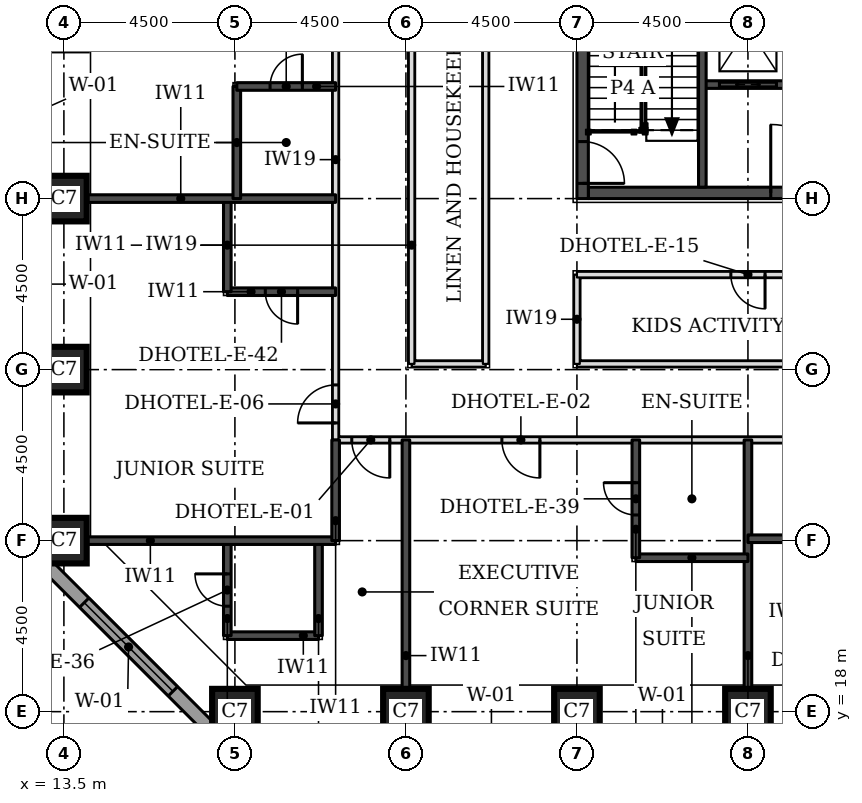
"""IFC4 building model, lengths in metres.
Left out: names, types, materials, properties, quantities, classifications, styles, units other than length and angle.
Written with IfcOpenShell. Run it as: python <this file> out.ifc"""

import sys

from ifc_helpers import new_model, si_unit, direction, frame, frame_2d, origin, origin_2d, place, context, subcontext, project, spatial, rectangle, extrude, element, fill, save


model = new_model("IFC4")
c1 = context("Model", 3, precision=1e-05, world=origin(), true_north=direction((0.0, 1.0)))
c2 = subcontext(c1, "Body", "Model", "MODEL_VIEW")
j1 = project(units=[si_unit("LENGTHUNIT", "METRE"), si_unit("PLANEANGLEUNIT", "RADIAN")], contexts=[c1])
p1 = place(None, origin())
s1 = spatial("IfcSite", under=j1, at=p1, CompositionType="ELEMENT")
p2 = place(p1, origin())
s2 = spatial("IfcBuilding", under=s1, at=p2, CompositionType="ELEMENT")
p3 = place(p2, frame((0.0, 0.0, 62.7)))
s3 = spatial("IfcBuildingStorey", under=s2, at=p3, CompositionType="ELEMENT", Elevation=62.7)
for number, where, z_axis, x_axis in (
    (1, (18.0, 18.0, 0.0), (0.0, 0.0, 1.0), (1.0, 0.0, 0.0)),
    (2, (22.5, 18.0, 0.0), (0.0, 0.0, 1.0), (1.0, 0.0, 0.0)),
    (3, (27.0, 18.0, 0.0), (0.0, 0.0, 1.0), (1.0, 0.0, 0.0)),
    (4, (31.5, 18.0, 0.0), (0.0, 0.0, 1.0), (1.0, 0.0, 0.0)),
    (5, (13.5, 22.5, 0.0), (0.0, 0.0, 1.0), (1.0, 0.0, 0.0)),
    (6, (13.5, 27.0, 0.0), (0.0, 0.0, 1.0), (1.0, 0.0, 0.0)),
    (7, (13.5, 31.5, 0.0), (0.0, 0.0, 1.0), (1.0, 0.0, 0.0)),
):
    element("IfcColumn", number, at=place(p3, frame(where, z_axis=z_axis, x_axis=x_axis)), inside=s3, PredefinedType="COLUMN", context=c2, shape_type="SweptSolid", body=[
        extrude(rectangle(XDim=1.2, YDim=1.2, at=origin_2d()), origin(), (0.0, 0.0, 1.0), 3.3),
    ])
p4 = place(p3, frame((27.3, 31.65, 0.0), z_axis=(0.0, 0.0, 1.0), x_axis=(1.0, 0.0, 0.0)))
e8 = element("IfcWall", 8, at=p4, inside=s3, PredefinedType="SHEAR", context=c2, shape_type="SweptSolid", body=[
    extrude(rectangle(XDim=8.4, YDim=0.3, at=frame_2d((4.2, 0.0))), origin(), (0.0, 0.0, 1.0), 3.3),
])
p5 = place(p4, frame((4.8, 0.0, 0.0)))
e9 = element("IfcOpeningElement", 9, at=p5, cuts=e8, PredefinedType="OPENING", context=c2, shape_type="SweptSolid", body=[
    extrude(rectangle(XDim=1.8, YDim=2.1, at=frame_2d((0.9, 1.05))), frame((0.0, 0.16, 0.0), z_axis=(0.0, -1.0, 0.0), x_axis=(1.0, 0.0, 0.0)), (0.0, 0.0, 1.0), 0.32),
])
p6 = place(p3, frame((27.15, 31.5, 0.0), z_axis=(0.0, 0.0, 1.0), x_axis=(0.0, 1.0, 0.0)))
e10 = element("IfcWall", 10, at=p6, inside=s3, PredefinedType="SHEAR", context=c2, shape_type="SweptSolid", body=[
    extrude(rectangle(XDim=9.0, YDim=0.3, at=frame_2d((4.5, 0.0))), origin(), (0.0, 0.0, 1.0), 3.3),
])
p7 = place(p6, frame((0.4, 0.0, 0.0)))
e11 = element("IfcOpeningElement", 11, at=p7, cuts=e10, PredefinedType="OPENING", context=c2, shape_type="SweptSolid", body=[
    extrude(rectangle(XDim=1.1, YDim=2.1, at=frame_2d((0.55, 1.05))), frame((0.0, 0.16, 0.0), z_axis=(0.0, -1.0, 0.0), x_axis=(1.0, 0.0, 0.0)), (0.0, 0.0, 1.0), 0.32),
])
p8 = place(p3, frame((12.674, 22.23, 0.0), z_axis=(0.0, 0.0, 1.0), x_axis=(0.707106781187, -0.707106781187, 0.0)))
e12 = element("IfcWall", 12, at=p8, inside=s3, PredefinedType="STANDARD", context=c2, shape_type="SweptSolid", body=[
    extrude(rectangle(XDim=7.151, YDim=0.35, at=frame_2d((3.576, 0.0))), origin(), (0.0, 0.0, 1.0), 3.055),
])
p9 = place(p8, frame((1.926, 0.0, 0.8)))
e13 = element("IfcOpeningElement", 13, at=p9, cuts=e12, PredefinedType="OPENING", context=c2, shape_type="SweptSolid", body=[
    extrude(rectangle(XDim=3.3, YDim=1.5, at=frame_2d((1.65, 0.75))), frame((0.0, 0.185, 0.0), z_axis=(0.0, -1.0, 0.0), x_axis=(1.0, 0.0, 0.0)), (0.0, 0.0, 1.0), 0.37),
])
p10 = place(p3, frame((20.65, 25.15, 0.0), z_axis=(0.0, 0.0, 1.0), x_axis=(1.0, 0.0, 0.0)))
e14 = element("IfcWall", 14, at=p10, inside=s3, PredefinedType="PARTITIONING", context=c2, shape_type="SweptSolid", body=[
    extrude(rectangle(XDim=32.2, YDim=0.15, at=frame_2d((16.1, 0.0))), origin(), (0.0, 0.0, 1.0), 3.08),
])
p11 = place(p10, frame((4.375, 0.0, 0.0)))
e15 = element("IfcOpeningElement", 15, at=p11, cuts=e14, PredefinedType="OPENING", context=c2, shape_type="SweptSolid", body=[
    extrude(rectangle(XDim=1.0, YDim=2.1, at=frame_2d((0.5, 1.05))), frame((0.0, 0.085, 0.0), z_axis=(0.0, -1.0, 0.0), x_axis=(1.0, 0.0, 0.0)), (0.0, 0.0, 1.0), 0.17),
])
p12 = place(p10, frame((16.075, 0.0, 0.0)))
e16 = element("IfcOpeningElement", 16, at=p12, cuts=e14, PredefinedType="OPENING", context=c2, shape_type="SweptSolid", body=[
    extrude(rectangle(XDim=1.0, YDim=2.1, at=frame_2d((0.5, 1.05))), frame((0.0, 0.085, 0.0), z_axis=(0.0, -1.0, 0.0), x_axis=(1.0, 0.0, 0.0)), (0.0, 0.0, 1.0), 0.17),
])
p13 = place(p10, frame((22.375, 0.0, 0.0)))
e17 = element("IfcOpeningElement", 17, at=p13, cuts=e14, PredefinedType="OPENING", context=c2, shape_type="SweptSolid", body=[
    extrude(rectangle(XDim=1.0, YDim=2.1, at=frame_2d((0.5, 1.05))), frame((0.0, 0.085, 0.0), z_axis=(0.0, -1.0, 0.0), x_axis=(1.0, 0.0, 0.0)), (0.0, 0.0, 1.0), 0.17),
])
p14 = place(p10, frame((0.425, 0.0, 0.0)))
e18 = element("IfcOpeningElement", 18, at=p14, cuts=e14, PredefinedType="OPENING", context=c2, shape_type="SweptSolid", body=[
    extrude(rectangle(XDim=1.0, YDim=2.1, at=frame_2d((0.5, 1.05))), frame((0.0, 0.085, 0.0), z_axis=(0.0, -1.0, 0.0), x_axis=(1.0, 0.0, 0.0)), (0.0, 0.0, 1.0), 0.17),
])
p15 = place(p10, frame((30.025, 0.0, 0.0)))
e19 = element("IfcOpeningElement", 19, at=p15, cuts=e14, PredefinedType="OPENING", context=c2, shape_type="SweptSolid", body=[
    extrude(rectangle(XDim=1.0, YDim=2.1, at=frame_2d((0.5, 1.05))), frame((0.0, 0.085, 0.0), z_axis=(0.0, -1.0, 0.0), x_axis=(1.0, 0.0, 0.0)), (0.0, 0.0, 1.0), 0.17),
])
p16 = place(p3, frame((20.65, 25.15, 0.0), z_axis=(0.0, 0.0, 1.0), x_axis=(0.0, 1.0, 0.0)))
e20 = element("IfcWall", 20, at=p16, inside=s3, PredefinedType="PARTITIONING", context=c2, shape_type="SweptSolid", body=[
    extrude(rectangle(XDim=24.35, YDim=0.15, at=frame_2d((12.175, 0.0))), origin(), (0.0, 0.0, 1.0), 3.08),
])
p17 = place(p16, frame((0.447, 0.0, 0.0)))
e21 = element("IfcOpeningElement", 21, at=p17, cuts=e20, PredefinedType="OPENING", context=c2, shape_type="SweptSolid", body=[
    extrude(rectangle(XDim=1.0, YDim=2.1, at=frame_2d((0.5, 1.05))), frame((0.0, 0.085, 0.0), z_axis=(0.0, -1.0, 0.0), x_axis=(1.0, 0.0, 0.0)), (0.0, 0.0, 1.0), 0.17),
])
p18 = place(p16, frame((11.825, 0.0, 0.0)))
e22 = element("IfcOpeningElement", 22, at=p18, cuts=e20, PredefinedType="OPENING", context=c2, shape_type="SweptSolid", body=[
    extrude(rectangle(XDim=1.0, YDim=2.1, at=frame_2d((0.5, 1.05))), frame((0.0, 0.085, 0.0), z_axis=(0.0, -1.0, 0.0), x_axis=(1.0, 0.0, 0.0)), (0.0, 0.0, 1.0), 0.17),
])
p19 = place(p16, frame((18.125, 0.0, 0.0)))
e23 = element("IfcOpeningElement", 23, at=p19, cuts=e20, PredefinedType="OPENING", context=c2, shape_type="SweptSolid", body=[
    extrude(rectangle(XDim=1.0, YDim=2.1, at=frame_2d((0.5, 1.05))), frame((0.0, 0.085, 0.0), z_axis=(0.0, -1.0, 0.0), x_axis=(1.0, 0.0, 0.0)), (0.0, 0.0, 1.0), 0.17),
])
p20 = place(p3, frame((22.65, 27.15, 0.0), z_axis=(0.0, 0.0, 1.0), x_axis=(1.0, 0.0, 0.0)))
e24 = element("IfcWall", 24, at=p20, inside=s3, PredefinedType="PARTITIONING", context=c2, shape_type="SweptSolid", body=[
    extrude(rectangle(XDim=1.95, YDim=0.15, at=frame_2d((0.975, 0.0))), origin(), (0.0, 0.0, 1.0), 3.08),
])
p21 = place(p3, frame((22.65, 27.15, 0.0), z_axis=(0.0, 0.0, 1.0), x_axis=(0.0, 1.0, 0.0)))
e25 = element("IfcWall", 25, at=p21, inside=s3, PredefinedType="PARTITIONING", context=c2, shape_type="SweptSolid", body=[
    extrude(rectangle(XDim=15.85, YDim=0.15, at=frame_2d((7.925, 0.0))), origin(), (0.0, 0.0, 1.0), 3.08),
])
p22 = place(p21, frame((9.225, 0.0, 0.0)))
e26 = element("IfcOpeningElement", 26, at=p22, cuts=e25, PredefinedType="OPENING", context=c2, shape_type="SweptSolid", body=[
    extrude(rectangle(XDim=0.9, YDim=2.1, at=frame_2d((0.45, 1.05))), frame((0.0, 0.085, 0.0), z_axis=(0.0, -1.0, 0.0), x_axis=(1.0, 0.0, 0.0)), (0.0, 0.0, 1.0), 0.17),
])
p23 = place(p3, frame((24.6, 27.15, 0.0), z_axis=(0.0, 0.0, 1.0), x_axis=(0.0, 1.0, 0.0)))
e27 = element("IfcWall", 27, at=p23, inside=s3, PredefinedType="PARTITIONING", context=c2, shape_type="SweptSolid", body=[
    extrude(rectangle(XDim=13.35, YDim=0.15, at=frame_2d((6.675, 0.0))), origin(), (0.0, 0.0, 1.0), 3.08),
])
p24 = place(p3, frame((27.0, 27.15, 0.0), z_axis=(0.0, 0.0, 1.0), x_axis=(1.0, 0.0, 0.0)))
e28 = element("IfcWall", 28, at=p24, inside=s3, PredefinedType="PARTITIONING", context=c2, shape_type="SweptSolid", body=[
    extrude(rectangle(XDim=11.5, YDim=0.15, at=frame_2d((5.75, 0.0))), origin(), (0.0, 0.0, 1.0), 3.08),
])
p25 = place(p3, frame((27.0, 27.15, 0.0), z_axis=(0.0, 0.0, 1.0), x_axis=(0.0, 1.0, 0.0)))
e29 = element("IfcWall", 29, at=p25, inside=s3, PredefinedType="PARTITIONING", context=c2, shape_type="SweptSolid", body=[
    extrude(rectangle(XDim=2.35, YDim=0.15, at=frame_2d((1.175, 0.0))), origin(), (0.0, 0.0, 1.0), 3.08),
])
p26 = place(p3, frame((27.0, 29.5, 0.0), z_axis=(0.0, 0.0, 1.0), x_axis=(1.0, 0.0, 0.0)))
e30 = element("IfcWall", 30, at=p26, inside=s3, PredefinedType="PARTITIONING", context=c2, shape_type="SweptSolid", body=[
    extrude(rectangle(XDim=9.0, YDim=0.15, at=frame_2d((4.5, 0.0))), origin(), (0.0, 0.0, 1.0), 3.08),
])
p27 = place(p26, frame((4.05, 0.0, 0.0)))
e31 = element("IfcOpeningElement", 31, at=p27, cuts=e30, PredefinedType="OPENING", context=c2, shape_type="SweptSolid", body=[
    extrude(rectangle(XDim=0.9, YDim=2.1, at=frame_2d((0.45, 1.05))), frame((0.0, 0.085, 0.0), z_axis=(0.0, -1.0, 0.0), x_axis=(1.0, 0.0, 0.0)), (0.0, 0.0, 1.0), 0.17),
])
for number, where, z_axis, x_axis in (
    (32, (22.5, 18.6, 0.0), (0.0, 0.0, 1.0), (0.0, 1.0, 0.0)),
    (33, (31.5, 18.6, 0.0), (0.0, 0.0, 1.0), (0.0, 1.0, 0.0)),
):
    element("IfcWall", number, at=place(p3, frame(where, z_axis=z_axis, x_axis=x_axis)), inside=s3, PredefinedType="SOLIDWALL", context=c2, shape_type="SweptSolid", body=[
        extrude(rectangle(XDim=6.55, YDim=0.2, at=frame_2d((3.275, 0.0))), origin(), (0.0, 0.0, 1.0), 3.08),
    ])
p28 = place(p3, frame((17.8, 20.0, 0.0), z_axis=(0.0, 0.0, 1.0), x_axis=(1.0, 0.0, 0.0)))
e34 = element("IfcWall", 34, at=p28, inside=s3, PredefinedType="SOLIDWALL", context=c2, shape_type="SweptSolid", body=[
    extrude(rectangle(XDim=2.4, YDim=0.2, at=frame_2d((1.2, 0.0))), origin(), (0.0, 0.0, 1.0), 3.08),
])
p29 = place(p3, frame((17.8, 20.0, 0.0), z_axis=(0.0, 0.0, 1.0), x_axis=(0.0, 1.0, 0.0)))
e35 = element("IfcWall", 35, at=p29, inside=s3, PredefinedType="SOLIDWALL", context=c2, shape_type="SweptSolid", body=[
    extrude(rectangle(XDim=2.5, YDim=0.2, at=frame_2d((1.25, 0.0))), origin(), (0.0, 0.0, 1.0), 3.08),
])
p30 = place(p29, frame((0.775, 0.0, 0.0)))
e36 = element("IfcOpeningElement", 36, at=p30, cuts=e35, PredefinedType="OPENING", context=c2, shape_type="SweptSolid", body=[
    extrude(rectangle(XDim=0.85, YDim=2.1, at=frame_2d((0.425, 1.05))), frame((0.0, 0.11, 0.0), z_axis=(0.0, -1.0, 0.0), x_axis=(1.0, 0.0, 0.0)), (0.0, 0.0, 1.0), 0.22),
])
p31 = place(p3, frame((20.2, 20.0, 0.0), z_axis=(0.0, 0.0, 1.0), x_axis=(0.0, 1.0, 0.0)))
e37 = element("IfcWall", 37, at=p31, inside=s3, PredefinedType="SOLIDWALL", context=c2, shape_type="SweptSolid", body=[
    extrude(rectangle(XDim=2.5, YDim=0.2, at=frame_2d((1.25, 0.0))), origin(), (0.0, 0.0, 1.0), 3.08),
])
p32 = place(p3, frame((28.55, 22.05, 0.0), z_axis=(0.0, 0.0, 1.0), x_axis=(1.0, 0.0, 0.0)))
e38 = element("IfcWall", 38, at=p32, inside=s3, PredefinedType="SOLIDWALL", context=c2, shape_type="SweptSolid", body=[
    extrude(rectangle(XDim=2.95, YDim=0.2, at=frame_2d((1.475, 0.0))), origin(), (0.0, 0.0, 1.0), 3.08),
])
p33 = place(p3, frame((28.55, 22.05, 0.0), z_axis=(0.0, 0.0, 1.0), x_axis=(0.0, 1.0, 0.0)))
e39 = element("IfcWall", 39, at=p33, inside=s3, PredefinedType="SOLIDWALL", context=c2, shape_type="SweptSolid", body=[
    extrude(rectangle(XDim=3.1, YDim=0.2, at=frame_2d((1.55, 0.0))), origin(), (0.0, 0.0, 1.0), 3.08),
])
p34 = place(p33, frame((1.125, 0.0, 0.0)))
e40 = element("IfcOpeningElement", 40, at=p34, cuts=e39, PredefinedType="OPENING", context=c2, shape_type="SweptSolid", body=[
    extrude(rectangle(XDim=0.85, YDim=2.1, at=frame_2d((0.425, 1.05))), frame((0.0, 0.11, 0.0), z_axis=(0.0, -1.0, 0.0), x_axis=(1.0, 0.0, 0.0)), (0.0, 0.0, 1.0), 0.22),
])
p35 = place(p3, frame((14.1, 22.5, 0.0), z_axis=(0.0, 0.0, 1.0), x_axis=(1.0, 0.0, 0.0)))
e41 = element("IfcWall", 41, at=p35, inside=s3, PredefinedType="SOLIDWALL", context=c2, shape_type="SweptSolid", body=[
    extrude(rectangle(XDim=6.55, YDim=0.2, at=frame_2d((3.275, 0.0))), origin(), (0.0, 0.0, 1.0), 3.08),
])
p36 = place(p3, frame((20.65, 22.5, 0.0), z_axis=(0.0, 0.0, 1.0), x_axis=(0.0, 1.0, 0.0)))
e42 = element("IfcWall", 42, at=p36, inside=s3, PredefinedType="SOLIDWALL", context=c2, shape_type="SweptSolid", body=[
    extrude(rectangle(XDim=2.65, YDim=0.2, at=frame_2d((1.325, 0.0))), origin(), (0.0, 0.0, 1.0), 3.08),
])
p37 = place(p3, frame((31.5, 22.55, 0.0), z_axis=(0.0, 0.0, 1.0), x_axis=(1.0, 0.0, 0.0)))
e43 = element("IfcWall", 43, at=p37, inside=s3, PredefinedType="SOLIDWALL", context=c2, shape_type="SweptSolid", body=[
    extrude(rectangle(XDim=2.45, YDim=0.2, at=frame_2d((1.225, 0.0))), origin(), (0.0, 0.0, 1.0), 3.08),
])
p38 = place(p3, frame((17.8, 29.05, 0.0), z_axis=(0.0, 0.0, 1.0), x_axis=(1.0, 0.0, 0.0)))
e44 = element("IfcWall", 44, at=p38, inside=s3, PredefinedType="SOLIDWALL", context=c2, shape_type="SweptSolid", body=[
    extrude(rectangle(XDim=2.85, YDim=0.2, at=frame_2d((1.425, 0.0))), origin(), (0.0, 0.0, 1.0), 3.08),
])
p39 = place(p38, frame((1.0, 0.0, 0.0)))
e45 = element("IfcOpeningElement", 45, at=p39, cuts=e44, PredefinedType="OPENING", context=c2, shape_type="SweptSolid", body=[
    extrude(rectangle(XDim=0.85, YDim=2.1, at=frame_2d((0.425, 1.05))), frame((0.0, 0.11, 0.0), z_axis=(0.0, -1.0, 0.0), x_axis=(1.0, 0.0, 0.0)), (0.0, 0.0, 1.0), 0.22),
])
p40 = place(p3, frame((17.8, 29.05, 0.0), z_axis=(0.0, 0.0, 1.0), x_axis=(0.0, 1.0, 0.0)))
e46 = element("IfcWall", 46, at=p40, inside=s3, PredefinedType="SOLIDWALL", context=c2, shape_type="SweptSolid", body=[
    extrude(rectangle(XDim=2.45, YDim=0.2, at=frame_2d((1.225, 0.0))), origin(), (0.0, 0.0, 1.0), 3.08),
])
p41 = place(p3, frame((14.1, 31.5, 0.0), z_axis=(0.0, 0.0, 1.0), x_axis=(1.0, 0.0, 0.0)))
e47 = element("IfcWall", 47, at=p41, inside=s3, PredefinedType="SOLIDWALL", context=c2, shape_type="SweptSolid", body=[
    extrude(rectangle(XDim=6.55, YDim=0.2, at=frame_2d((3.275, 0.0))), origin(), (0.0, 0.0, 1.0), 3.08),
])
p42 = place(p3, frame((18.05, 31.5, 0.0), z_axis=(0.0, 0.0, 1.0), x_axis=(0.0, 1.0, 0.0)))
e48 = element("IfcWall", 48, at=p42, inside=s3, PredefinedType="SOLIDWALL", context=c2, shape_type="SweptSolid", body=[
    extrude(rectangle(XDim=2.95, YDim=0.2, at=frame_2d((1.475, 0.0))), origin(), (0.0, 0.0, 1.0), 3.08),
])
p43 = place(p3, frame((18.05, 34.45, 0.0), z_axis=(0.0, 0.0, 1.0), x_axis=(1.0, 0.0, 0.0)))
e49 = element("IfcWall", 49, at=p43, inside=s3, PredefinedType="SOLIDWALL", context=c2, shape_type="SweptSolid", body=[
    extrude(rectangle(XDim=2.6, YDim=0.2, at=frame_2d((1.3, 0.0))), origin(), (0.0, 0.0, 1.0), 3.08),
])
p44 = place(p43, frame((0.875, 0.0, 0.0)))
e50 = element("IfcOpeningElement", 50, at=p44, cuts=e49, PredefinedType="OPENING", context=c2, shape_type="SweptSolid", body=[
    extrude(rectangle(XDim=0.85, YDim=2.1, at=frame_2d((0.425, 1.05))), frame((0.0, 0.11, 0.0), z_axis=(0.0, -1.0, 0.0), x_axis=(1.0, 0.0, 0.0)), (0.0, 0.0, 1.0), 0.22),
])
p45 = place(p3, frame((30.3, 34.5, 0.0), z_axis=(0.0, 0.0, 1.0), x_axis=(1.0, 0.0, 0.0)))
e51 = element("IfcWall", 51, at=p45, inside=s3, PredefinedType="SOLIDWALL", context=c2, shape_type="SweptSolid", body=[
    extrude(rectangle(XDim=5.4, YDim=0.2, at=frame_2d((2.7, 0.0))), origin(), (0.0, 0.0, 1.0), 3.08),
])
p46 = place(p45, frame((0.45, 0.0, 0.0)))
e52 = element("IfcOpeningElement", 52, at=p46, cuts=e51, PredefinedType="OPENING", context=c2, shape_type="SweptSolid", body=[
    extrude(rectangle(XDim=1.5, YDim=2.1, at=frame_2d((0.75, 1.05))), frame((0.0, 0.11, 0.0), z_axis=(0.0, -1.0, 0.0), x_axis=(1.0, 0.0, 0.0)), (0.0, 0.0, 1.0), 0.22),
])
p47 = place(p3, frame((30.3, 31.8, 0.0), z_axis=(0.0, 0.0, 1.0), x_axis=(0.0, 1.0, 0.0)))
e53 = element("IfcWall", 53, at=p47, inside=s3, PredefinedType="SOLIDWALL", context=c2, shape_type="SweptSolid", body=[
    extrude(rectangle(XDim=5.7, YDim=0.2, at=frame_2d((2.85, 0.0))), origin(), (0.0, 0.0, 1.0), 3.08),
])
p48 = place(p9, origin())
e54 = element("IfcWindow", 54, at=p48, inside=s3, PartitioningType="SINGLE_PANEL", PredefinedType="WINDOW", context=c2, shape_type="SweptSolid", body=[
    extrude(rectangle(XDim=3.3, YDim=1.5, at=frame_2d((1.65, 0.75))), frame((0.0, 0.085, 0.0), z_axis=(0.0, -1.0, 0.0), x_axis=(1.0, 0.0, 0.0)), (0.0, 0.0, 1.0), 0.06),
])
fill(e13, e54)
p49 = place(p11, frame((1.0, 0.0, 0.0), z_axis=(0.0, 0.0, 1.0), x_axis=(-1.0, 0.0, 0.0)))
e55 = element("IfcDoor", 55, at=p49, inside=s3, OperationType="SINGLE_SWING_LEFT", PredefinedType="DOOR", context=c2, shape_type="SweptSolid", body=[
    extrude(rectangle(XDim=1.0, YDim=2.1, at=frame_2d((0.5, 1.05))), frame((0.0, 0.025, 0.0), z_axis=(0.0, -1.0, 0.0), x_axis=(1.0, 0.0, 0.0)), (0.0, 0.0, 1.0), 0.05),
])
fill(e15, e55)
p50 = place(p34, origin())
e56 = element("IfcDoor", 56, at=p50, inside=s3, OperationType="SINGLE_SWING_RIGHT", PredefinedType="DOOR", context=c2, shape_type="SweptSolid", body=[
    extrude(rectangle(XDim=0.85, YDim=2.1, at=frame_2d((0.425, 1.05))), frame((0.0, 0.025, 0.0), z_axis=(0.0, -1.0, 0.0), x_axis=(1.0, 0.0, 0.0)), (0.0, 0.0, 1.0), 0.05),
])
fill(e40, e56)
p51 = place(p17, origin())
e57 = element("IfcDoor", 57, at=p51, inside=s3, OperationType="SINGLE_SWING_LEFT", PredefinedType="DOOR", context=c2, shape_type="SweptSolid", body=[
    extrude(rectangle(XDim=1.0, YDim=2.1, at=frame_2d((0.5, 1.05))), frame((0.0, 0.025, 0.0), z_axis=(0.0, -1.0, 0.0), x_axis=(1.0, 0.0, 0.0)), (0.0, 0.0, 1.0), 0.05),
])
fill(e21, e57)
p52 = place(p39, frame((0.85, 0.0, 0.0), z_axis=(0.0, 0.0, 1.0), x_axis=(-1.0, 0.0, 0.0)))
e58 = element("IfcDoor", 58, at=p52, inside=s3, OperationType="SINGLE_SWING_LEFT", PredefinedType="DOOR", context=c2, shape_type="SweptSolid", body=[
    extrude(rectangle(XDim=0.85, YDim=2.1, at=frame_2d((0.425, 1.05))), frame((0.0, 0.025, 0.0), z_axis=(0.0, -1.0, 0.0), x_axis=(1.0, 0.0, 0.0)), (0.0, 0.0, 1.0), 0.05),
])
fill(e45, e58)
p53 = place(p44, origin())
e59 = element("IfcDoor", 59, at=p53, inside=s3, OperationType="SINGLE_SWING_RIGHT", PredefinedType="DOOR", context=c2, shape_type="SweptSolid", body=[
    extrude(rectangle(XDim=0.85, YDim=2.1, at=frame_2d((0.425, 1.05))), frame((0.0, 0.025, 0.0), z_axis=(0.0, -1.0, 0.0), x_axis=(1.0, 0.0, 0.0)), (0.0, 0.0, 1.0), 0.05),
])
fill(e50, e59)
p54 = place(p14, frame((1.0, 0.0, 0.0), z_axis=(0.0, 0.0, 1.0), x_axis=(-1.0, 0.0, 0.0)))
e60 = element("IfcDoor", 60, at=p54, inside=s3, OperationType="SINGLE_SWING_LEFT", PredefinedType="DOOR", context=c2, shape_type="SweptSolid", body=[
    extrude(rectangle(XDim=1.0, YDim=2.1, at=frame_2d((0.5, 1.05))), frame((0.0, 0.025, 0.0), z_axis=(0.0, -1.0, 0.0), x_axis=(1.0, 0.0, 0.0)), (0.0, 0.0, 1.0), 0.05),
])
fill(e18, e60)
p55 = place(p30, origin())
e61 = element("IfcDoor", 61, at=p55, inside=s3, OperationType="SINGLE_SWING_RIGHT", PredefinedType="DOOR", context=c2, shape_type="SweptSolid", body=[
    extrude(rectangle(XDim=0.85, YDim=2.1, at=frame_2d((0.425, 1.05))), frame((0.0, 0.025, 0.0), z_axis=(0.0, -1.0, 0.0), x_axis=(1.0, 0.0, 0.0)), (0.0, 0.0, 1.0), 0.05),
])
fill(e36, e61)
p56 = place(p27, frame((0.9, 0.0, 0.0), z_axis=(0.0, 0.0, 1.0), x_axis=(-1.0, 0.0, 0.0)))
e62 = element("IfcDoor", 62, at=p56, inside=s3, OperationType="SINGLE_SWING_LEFT", PredefinedType="DOOR", context=c2, shape_type="SweptSolid", body=[
    extrude(rectangle(XDim=0.9, YDim=2.1, at=frame_2d((0.45, 1.05))), frame((0.0, 0.025, 0.0), z_axis=(0.0, -1.0, 0.0), x_axis=(1.0, 0.0, 0.0)), (0.0, 0.0, 1.0), 0.05),
])
fill(e31, e62)
p57 = place(p7, frame((1.1, 0.0, 0.0), z_axis=(0.0, 0.0, 1.0), x_axis=(-1.0, 0.0, 0.0)))
e63 = element("IfcDoor", 63, at=p57, inside=s3, OperationType="SINGLE_SWING_RIGHT", PredefinedType="DOOR", context=c2, shape_type="SweptSolid", body=[
    extrude(rectangle(XDim=1.1, YDim=2.1, at=frame_2d((0.55, 1.05))), frame((0.0, 0.025, 0.0), z_axis=(0.0, -1.0, 0.0), x_axis=(1.0, 0.0, 0.0)), (0.0, 0.0, 1.0), 0.05),
])
fill(e11, e63)
p58 = place(p46, origin())
e64 = element("IfcDoor", 64, at=p58, inside=s3, OperationType="DOUBLE_DOOR_SLIDING", PredefinedType="DOOR", context=c2, shape_type="SweptSolid", body=[
    extrude(rectangle(XDim=1.5, YDim=2.1, at=frame_2d((0.75, 1.05))), frame((0.0, 0.025, 0.0), z_axis=(0.0, -1.0, 0.0), x_axis=(1.0, 0.0, 0.0)), (0.0, 0.0, 1.0), 0.05),
])
fill(e52, e64)
p59 = place(p5, origin())
e65 = element("IfcDoor", 65, at=p59, inside=s3, OperationType="SINGLE_SWING_LEFT", PredefinedType="DOOR", context=c2, shape_type="SweptSolid", body=[
    extrude(rectangle(XDim=1.8, YDim=2.1, at=frame_2d((0.9, 1.05))), frame((0.0, 0.025, 0.0), z_axis=(0.0, -1.0, 0.0), x_axis=(1.0, 0.0, 0.0)), (0.0, 0.0, 1.0), 0.05),
])
fill(e9, e65)
save(model, sys.argv[1])
